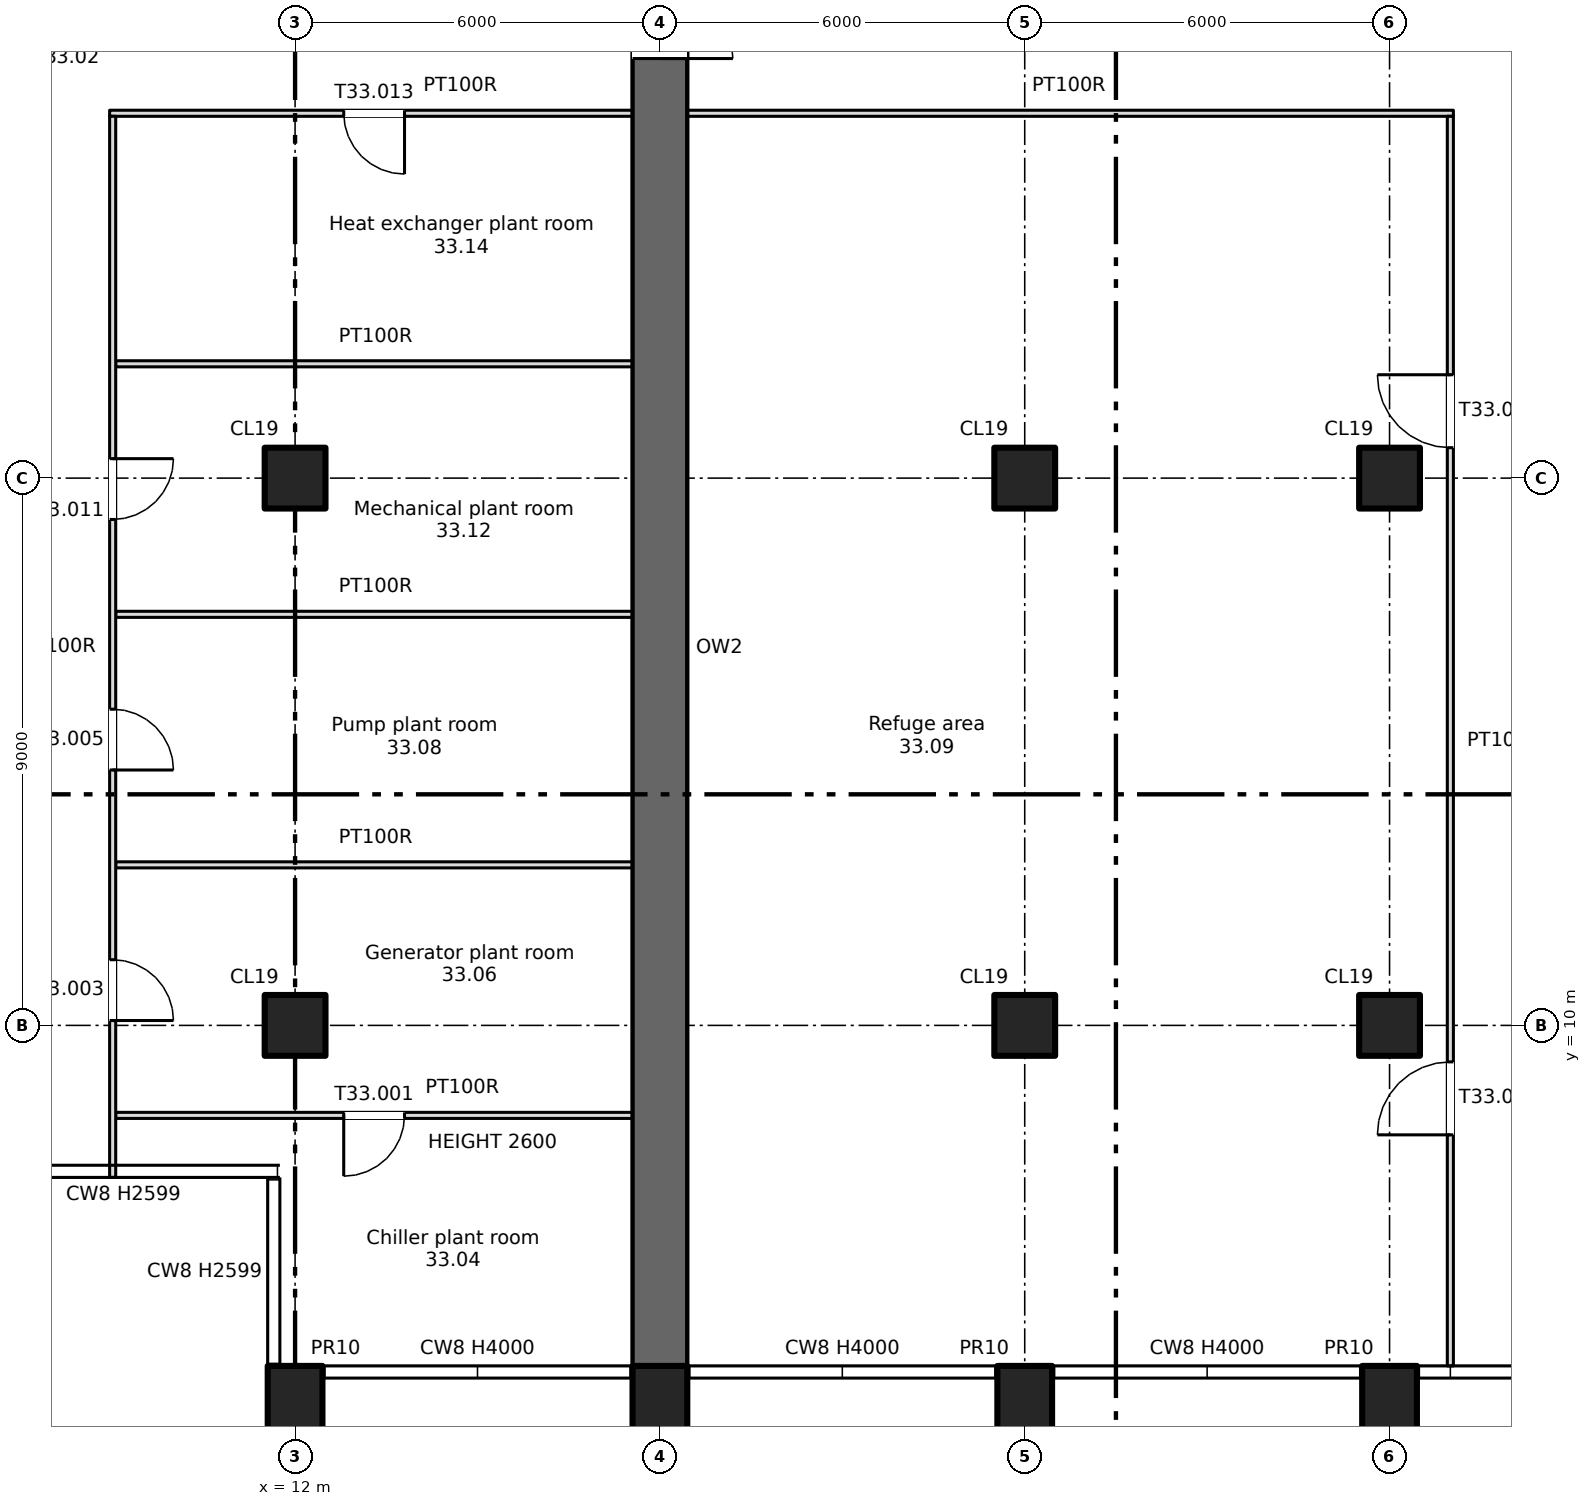
"""IFC4 building model, lengths in metres.
Left out: names, types, materials, properties, quantities, classifications, styles, units other than length and angle.
Written with IfcOpenShell. Run it as: python <this file> out.ifc"""

import sys

from ifc_helpers import new_model, si_unit, direction, frame, frame_2d, origin, origin_2d, place, context, subcontext, project, spatial, rectangle, extrude, element, fill, save


model = new_model("IFC4")
c1 = context("Model", 3, precision=1e-05, world=origin(), true_north=direction((0.0, 1.0)))
c2 = subcontext(c1, "Body", "Model", "MODEL_VIEW")
j1 = project(units=[si_unit("LENGTHUNIT", "METRE"), si_unit("PLANEANGLEUNIT", "RADIAN")], contexts=[c1])
p1 = place(None, origin())
s1 = spatial("IfcSite", under=j1, at=p1, CompositionType="ELEMENT")
p2 = place(p1, origin())
s2 = spatial("IfcBuilding", under=s1, at=p2, CompositionType="ELEMENT")
p3 = place(p2, frame((0.0, 0.0, 226.75)))
s3 = spatial("IfcBuildingStorey", under=s2, at=p3, CompositionType="ELEMENT", Elevation=226.75)
for number, where, z_axis, x_axis in (
    (1, (12.0, 3.7, -0.6), (0.0, 0.0, 1.0), (1.0, 0.0, 0.0)),
    (2, (18.0, 3.7, -0.6), (0.0, 0.0, 1.0), (1.0, 0.0, 0.0)),
    (3, (24.0, 3.7, -0.6), (0.0, 0.0, 1.0), (1.0, 0.0, 0.0)),
    (4, (30.0, 3.7, -0.6), (0.0, 0.0, 1.0), (1.0, 0.0, 0.0)),
):
    element("IfcColumn", number, at=place(p3, frame(where, z_axis=z_axis, x_axis=x_axis)), inside=s3, PredefinedType="COLUMN", context=c2, shape_type="SweptSolid", body=[
        extrude(rectangle(XDim=0.9, YDim=1.4, at=origin_2d()), origin(), (0.0, 0.0, 1.0), 4.8),
    ])
for number, where, z_axis, x_axis in (
    (5, (12.0, 10.0, 0.0), (0.0, 0.0, 1.0), (1.0, 0.0, 0.0)),
    (6, (12.0, 19.0, 0.0), (0.0, 0.0, 1.0), (1.0, 0.0, 0.0)),
    (7, (24.0, 10.0, 0.0), (0.0, 0.0, 1.0), (1.0, 0.0, 0.0)),
    (8, (24.0, 19.0, 0.0), (0.0, 0.0, 1.0), (1.0, 0.0, 0.0)),
    (9, (30.0, 10.0, 0.0), (0.0, 0.0, 1.0), (1.0, 0.0, 0.0)),
    (10, (30.0, 19.0, 0.0), (0.0, 0.0, 1.0), (1.0, 0.0, 0.0)),
):
    element("IfcColumn", number, at=place(p3, frame(where, z_axis=z_axis, x_axis=x_axis)), inside=s3, PredefinedType="COLUMN", context=c2, shape_type="SweptSolid", body=[
        extrude(rectangle(XDim=1.0, YDim=1.0, at=origin_2d()), origin(), (0.0, 0.0, 1.0), 4.2),
    ])
p4 = place(p3, frame((18.0, 4.4, 0.0), z_axis=(0.0, 0.0, 1.0), x_axis=(0.0, 1.0, 0.0)))
e11 = element("IfcWall", 11, at=p4, inside=s3, PredefinedType="SHEAR", context=c2, shape_type="SweptSolid", body=[
    extrude(rectangle(XDim=23.6, YDim=0.9, at=frame_2d((11.8, 0.0))), origin(), (0.0, 0.0, 1.0), 4.2),
])
p5 = place(p4, frame((21.5, 0.0, 0.0)))
e12 = element("IfcOpeningElement", 12, at=p5, cuts=e11, PredefinedType="OPENING", context=c2, shape_type="SweptSolid", body=[
    extrude(rectangle(XDim=1.2, YDim=2.1, at=frame_2d((0.6, 1.05))), frame((0.0, 0.46, 0.0), z_axis=(0.0, -1.0, 0.0), x_axis=(1.0, 0.0, 0.0)), (0.0, 0.0, 1.0), 0.92),
])
p6 = place(p3, frame((9.05, 8.52, 0.0), z_axis=(0.0, 0.0, 1.0), x_axis=(1.0, 0.0, 0.0)))
e13 = element("IfcWall", 13, at=p6, inside=s3, PredefinedType="PARTITIONING", context=c2, shape_type="SweptSolid", body=[
    extrude(rectangle(XDim=8.55, YDim=0.1, at=frame_2d((4.275, 0.0))), origin(), (0.0, 0.0, 1.0), 2.6),
])
p7 = place(p6, frame((3.75, 0.0, 0.0)))
e14 = element("IfcOpeningElement", 14, at=p7, cuts=e13, PredefinedType="OPENING", context=c2, shape_type="SweptSolid", body=[
    extrude(rectangle(XDim=1.0, YDim=2.1, at=frame_2d((0.5, 1.05))), frame((0.0, 0.06, 0.0), z_axis=(0.0, -1.0, 0.0), x_axis=(1.0, 0.0, 0.0)), (0.0, 0.0, 1.0), 0.12),
])
for number, where, z_axis, x_axis in (
    (15, (9.05, 12.64, 0.0), (0.0, 0.0, 1.0), (1.0, 0.0, 0.0)),
    (16, (9.05, 16.76, 0.0), (0.0, 0.0, 1.0), (1.0, 0.0, 0.0)),
    (17, (9.05, 20.88, 0.0), (0.0, 0.0, 1.0), (1.0, 0.0, 0.0)),
):
    element("IfcWall", number, at=place(p3, frame(where, z_axis=z_axis, x_axis=x_axis)), inside=s3, PredefinedType="PARTITIONING", context=c2, shape_type="SweptSolid", body=[
        extrude(rectangle(XDim=8.55, YDim=0.1, at=frame_2d((4.275, 0.0))), origin(), (0.0, 0.0, 1.0), 4.2),
    ])
p8 = place(p3, frame((8.95, 25.0, 0.0), z_axis=(0.0, 0.0, 1.0), x_axis=(1.0, 0.0, 0.0)))
e18 = element("IfcWall", 18, at=p8, inside=s3, PredefinedType="PARTITIONING", context=c2, shape_type="SweptSolid", body=[
    extrude(rectangle(XDim=8.65, YDim=0.1, at=frame_2d((4.325, 0.0))), origin(), (0.0, 0.0, 1.0), 4.2),
])
p9 = place(p8, frame((3.85, 0.0, 0.0)))
e19 = element("IfcOpeningElement", 19, at=p9, cuts=e18, PredefinedType="OPENING", context=c2, shape_type="SweptSolid", body=[
    extrude(rectangle(XDim=1.0, YDim=2.1, at=frame_2d((0.5, 1.05))), frame((0.0, 0.06, 0.0), z_axis=(0.0, -1.0, 0.0), x_axis=(1.0, 0.0, 0.0)), (0.0, 0.0, 1.0), 0.12),
])
p10 = place(p3, frame((18.4, 25.0, 0.0), z_axis=(0.0, 0.0, 1.0), x_axis=(1.0, 0.0, 0.0)))
e20 = element("IfcWall", 20, at=p10, inside=s3, PredefinedType="PARTITIONING", context=c2, shape_type="SweptSolid", body=[
    extrude(rectangle(XDim=12.65, YDim=0.1, at=frame_2d((6.325, 0.0))), origin(), (0.0, 0.0, 1.0), 4.2),
])
p11 = place(p3, frame((9.0, 7.5, 0.0), z_axis=(0.0, 0.0, 1.0), x_axis=(0.0, 1.0, 0.0)))
e21 = element("IfcWall", 21, at=p11, inside=s3, PredefinedType="PARTITIONING", context=c2, shape_type="SweptSolid", body=[
    extrude(rectangle(XDim=17.45, YDim=0.1, at=frame_2d((8.725, 0.0))), origin(), (0.0, 0.0, 1.0), 4.2),
])
p12 = place(p11, frame((2.58, 0.0, 0.0)))
e22 = element("IfcOpeningElement", 22, at=p12, cuts=e21, PredefinedType="OPENING", context=c2, shape_type="SweptSolid", body=[
    extrude(rectangle(XDim=1.0, YDim=2.1, at=frame_2d((0.5, 1.05))), frame((0.0, 0.06, 0.0), z_axis=(0.0, -1.0, 0.0), x_axis=(1.0, 0.0, 0.0)), (0.0, 0.0, 1.0), 0.12),
])
p13 = place(p11, frame((6.7, 0.0, 0.0)))
e23 = element("IfcOpeningElement", 23, at=p13, cuts=e21, PredefinedType="OPENING", context=c2, shape_type="SweptSolid", body=[
    extrude(rectangle(XDim=1.0, YDim=2.1, at=frame_2d((0.5, 1.05))), frame((0.0, 0.06, 0.0), z_axis=(0.0, -1.0, 0.0), x_axis=(1.0, 0.0, 0.0)), (0.0, 0.0, 1.0), 0.12),
])
p14 = place(p11, frame((10.82, 0.0, 0.0)))
e24 = element("IfcOpeningElement", 24, at=p14, cuts=e21, PredefinedType="OPENING", context=c2, shape_type="SweptSolid", body=[
    extrude(rectangle(XDim=1.0, YDim=2.1, at=frame_2d((0.5, 1.05))), frame((0.0, 0.06, 0.0), z_axis=(0.0, -1.0, 0.0), x_axis=(1.0, 0.0, 0.0)), (0.0, 0.0, 1.0), 0.12),
])
p15 = place(p3, frame((31.0, 4.4, 0.0), z_axis=(0.0, 0.0, 1.0), x_axis=(0.0, 1.0, 0.0)))
e25 = element("IfcWall", 25, at=p15, inside=s3, PredefinedType="PARTITIONING", context=c2, shape_type="SweptSolid", body=[
    extrude(rectangle(XDim=20.55, YDim=0.1, at=frame_2d((10.275, 0.0))), origin(), (0.0, 0.0, 1.0), 4.2),
])
p16 = place(p15, frame((3.8, 0.0, 0.0)))
e26 = element("IfcOpeningElement", 26, at=p16, cuts=e25, PredefinedType="OPENING", context=c2, shape_type="SweptSolid", body=[
    extrude(rectangle(XDim=1.2, YDim=2.1, at=frame_2d((0.6, 1.05))), frame((0.0, 0.06, 0.0), z_axis=(0.0, -1.0, 0.0), x_axis=(1.0, 0.0, 0.0)), (0.0, 0.0, 1.0), 0.12),
])
p17 = place(p15, frame((15.1, 0.0, 0.0)))
e27 = element("IfcOpeningElement", 27, at=p17, cuts=e25, PredefinedType="OPENING", context=c2, shape_type="SweptSolid", body=[
    extrude(rectangle(XDim=1.2, YDim=2.1, at=frame_2d((0.6, 1.05))), frame((0.0, 0.06, 0.0), z_axis=(0.0, -1.0, 0.0), x_axis=(1.0, 0.0, 0.0)), (0.0, 0.0, 1.0), 0.12),
])
p18 = place(p7, origin())
e28 = element("IfcDoor", 28, at=p18, inside=s3, OperationType="SINGLE_SWING_LEFT", PredefinedType="DOOR", context=c2, shape_type="SweptSolid", body=[
    extrude(rectangle(XDim=1.0, YDim=2.1, at=frame_2d((0.5, 1.05))), frame((0.0, 0.025, 0.0), z_axis=(0.0, -1.0, 0.0), x_axis=(1.0, 0.0, 0.0)), (0.0, 0.0, 1.0), 0.05),
])
fill(e14, e28)
p19 = place(p12, origin())
e29 = element("IfcDoor", 29, at=p19, inside=s3, OperationType="SINGLE_SWING_LEFT", PredefinedType="DOOR", context=c2, shape_type="SweptSolid", body=[
    extrude(rectangle(XDim=1.0, YDim=2.1, at=frame_2d((0.5, 1.05))), frame((0.0, 0.025, 0.0), z_axis=(0.0, -1.0, 0.0), x_axis=(1.0, 0.0, 0.0)), (0.0, 0.0, 1.0), 0.05),
])
fill(e22, e29)
p20 = place(p13, origin())
e30 = element("IfcDoor", 30, at=p20, inside=s3, OperationType="SINGLE_SWING_LEFT", PredefinedType="DOOR", context=c2, shape_type="SweptSolid", body=[
    extrude(rectangle(XDim=1.0, YDim=2.1, at=frame_2d((0.5, 1.05))), frame((0.0, 0.025, 0.0), z_axis=(0.0, -1.0, 0.0), x_axis=(1.0, 0.0, 0.0)), (0.0, 0.0, 1.0), 0.05),
])
fill(e23, e30)
p21 = place(p16, origin())
e31 = element("IfcDoor", 31, at=p21, inside=s3, OperationType="SINGLE_SWING_LEFT", PredefinedType="DOOR", context=c2, shape_type="SweptSolid", body=[
    extrude(rectangle(XDim=1.2, YDim=2.1, at=frame_2d((0.6, 1.05))), frame((0.0, 0.025, 0.0), z_axis=(0.0, -1.0, 0.0), x_axis=(1.0, 0.0, 0.0)), (0.0, 0.0, 1.0), 0.05),
])
fill(e26, e31)
p22 = place(p17, origin())
e32 = element("IfcDoor", 32, at=p22, inside=s3, OperationType="SINGLE_SWING_RIGHT", PredefinedType="DOOR", context=c2, shape_type="SweptSolid", body=[
    extrude(rectangle(XDim=1.2, YDim=2.1, at=frame_2d((0.6, 1.05))), frame((0.0, 0.025, 0.0), z_axis=(0.0, -1.0, 0.0), x_axis=(1.0, 0.0, 0.0)), (0.0, 0.0, 1.0), 0.05),
])
fill(e27, e32)
p23 = place(p14, origin())
e33 = element("IfcDoor", 33, at=p23, inside=s3, OperationType="SINGLE_SWING_RIGHT", PredefinedType="DOOR", context=c2, shape_type="SweptSolid", body=[
    extrude(rectangle(XDim=1.0, YDim=2.1, at=frame_2d((0.5, 1.05))), frame((0.0, 0.025, 0.0), z_axis=(0.0, -1.0, 0.0), x_axis=(1.0, 0.0, 0.0)), (0.0, 0.0, 1.0), 0.05),
])
fill(e24, e33)
p24 = place(p9, origin())
e34 = element("IfcDoor", 34, at=p24, inside=s3, OperationType="SINGLE_SWING_RIGHT", PredefinedType="DOOR", context=c2, shape_type="SweptSolid", body=[
    extrude(rectangle(XDim=1.0, YDim=2.1, at=frame_2d((0.5, 1.05))), frame((0.0, 0.025, 0.0), z_axis=(0.0, -1.0, 0.0), x_axis=(1.0, 0.0, 0.0)), (0.0, 0.0, 1.0), 0.05),
])
fill(e19, e34)
p25 = place(p5, origin())
e35 = element("IfcDoor", 35, at=p25, inside=s3, OperationType="SINGLE_SWING_LEFT", PredefinedType="DOOR", context=c2, shape_type="SweptSolid", body=[
    extrude(rectangle(XDim=1.2, YDim=2.1, at=frame_2d((0.6, 1.05))), frame((0.0, 0.025, 0.0), z_axis=(0.0, -1.0, 0.0), x_axis=(1.0, 0.0, 0.0)), (0.0, 0.0, 1.0), 0.05),
])
fill(e12, e35)
save(model, sys.argv[1])
